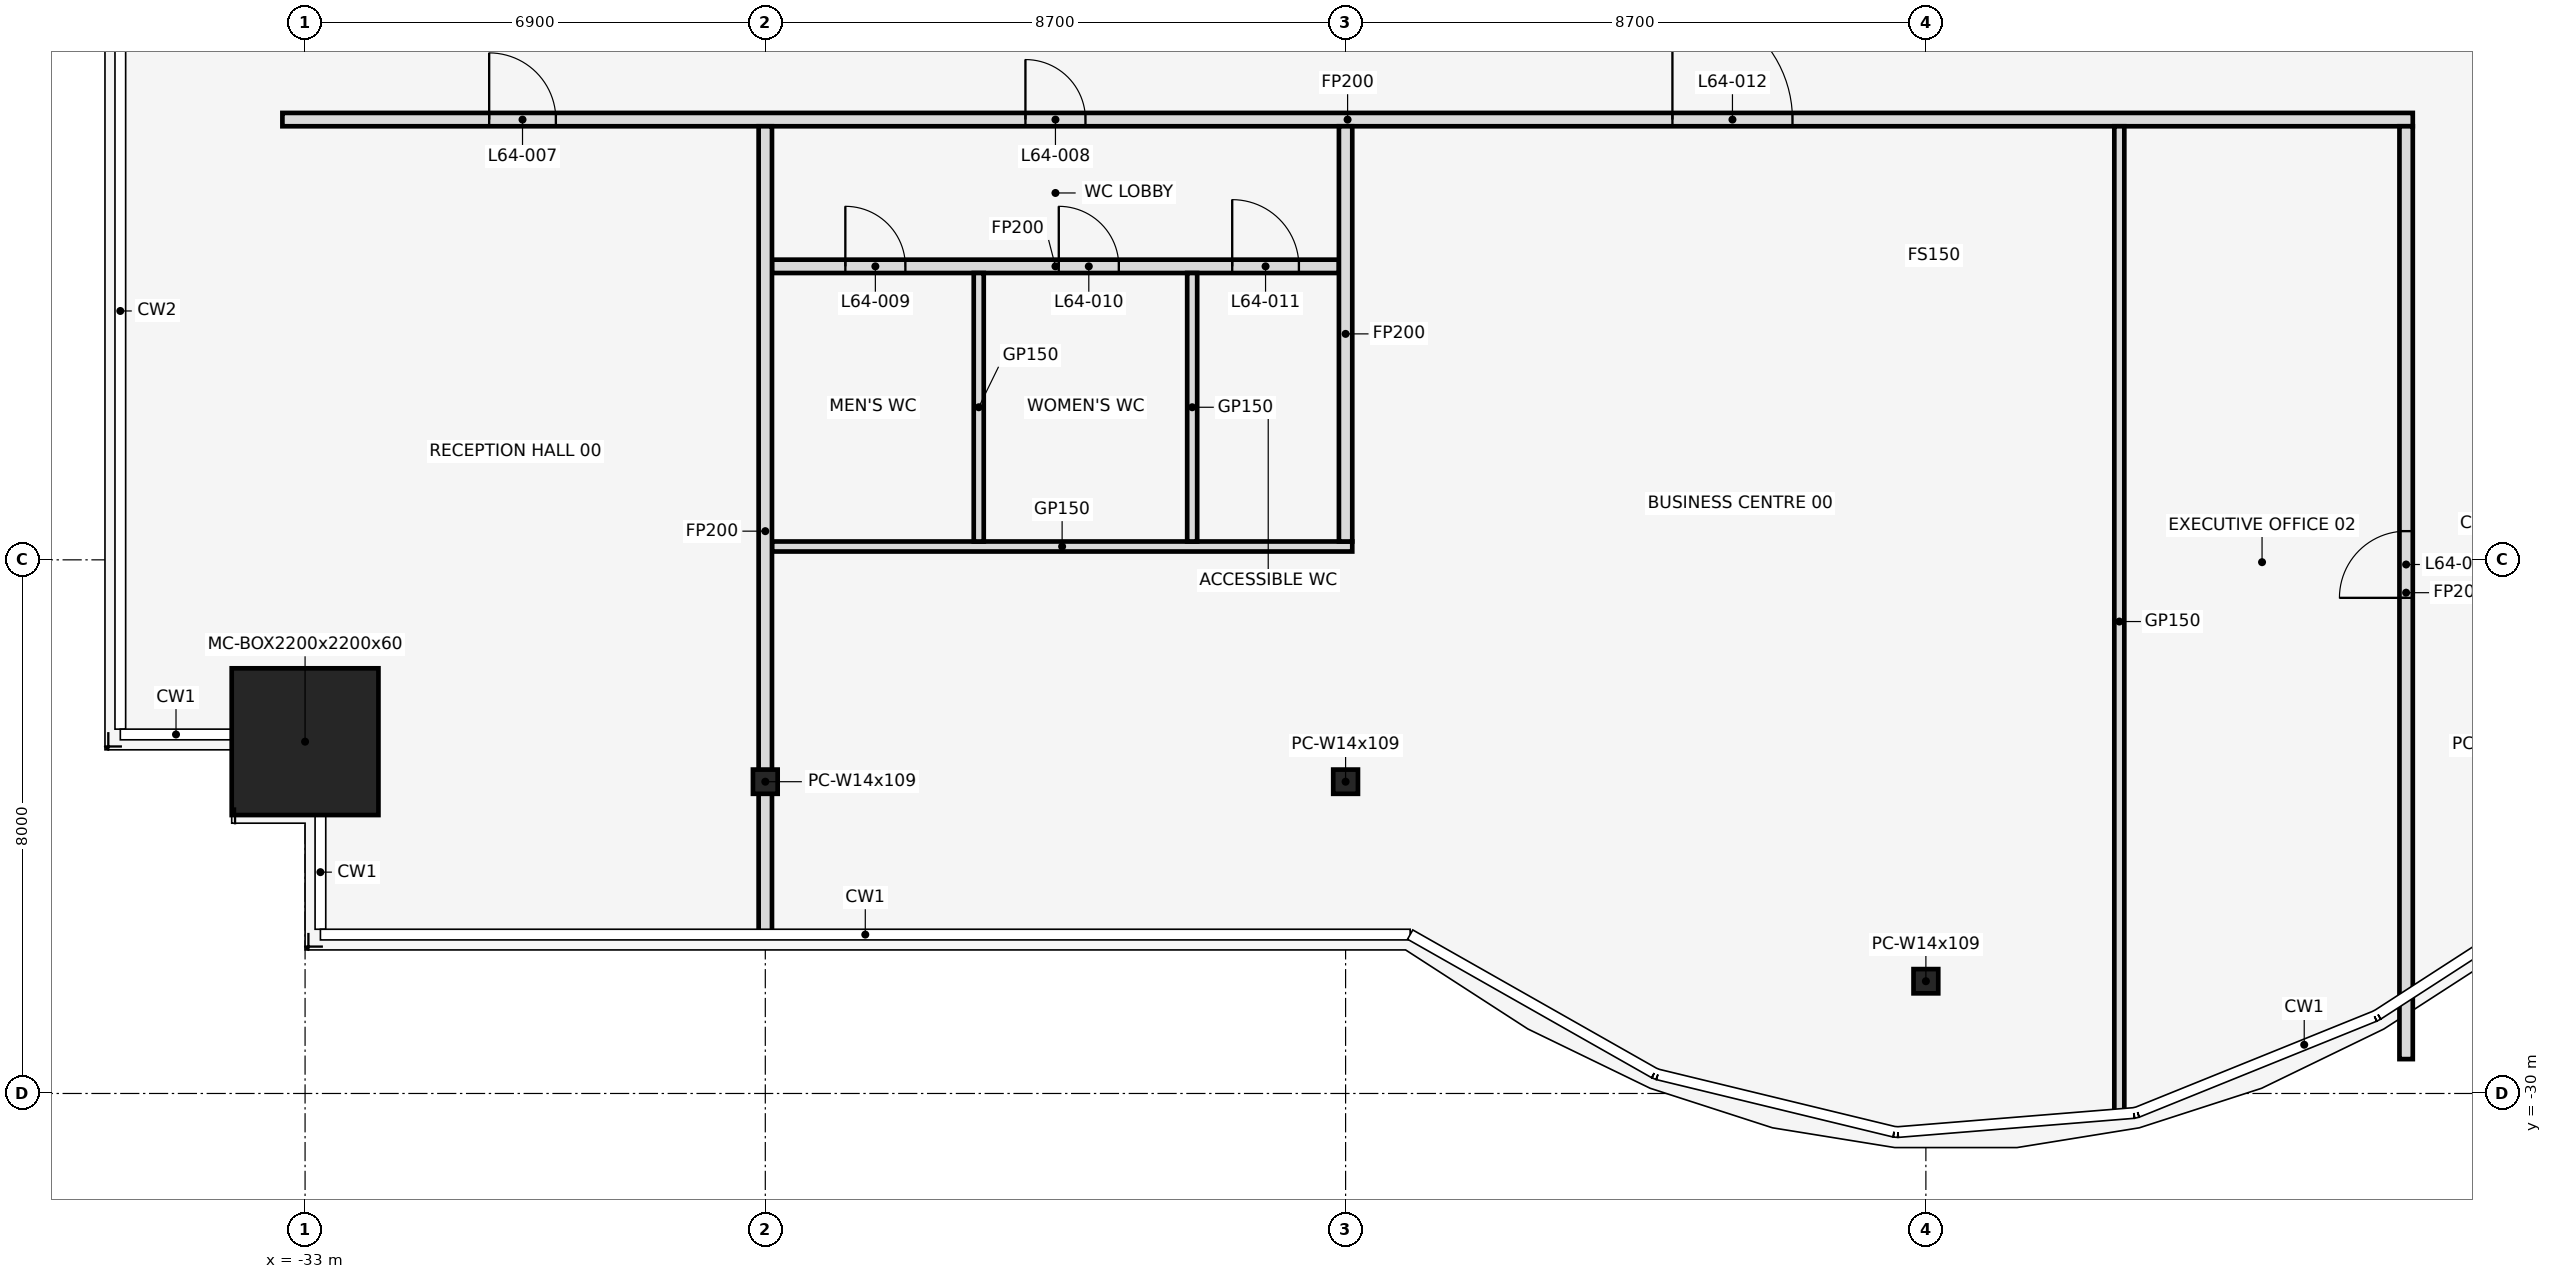
"""IFC4 building model, lengths in metres.
Left out: names, types, materials, properties, quantities, classifications, styles, units other than length and angle.
Written with IfcOpenShell. Run it as: python <this file> out.ifc"""

import sys

from ifc_helpers import new_model, si_unit, direction, frame, frame_2d, origin, origin_2d, place, context, subcontext, project, spatial, rectangle, hollow_rectangle, i_section, extrude, element, fill, save


model = new_model("IFC4")
c1 = context("Model", 3, precision=1e-05, world=origin(), true_north=direction((0.0, 1.0)))
c2 = subcontext(c1, "Body", "Model", "MODEL_VIEW")
j1 = project(units=[si_unit("LENGTHUNIT", "METRE"), si_unit("PLANEANGLEUNIT", "RADIAN")], contexts=[c1])
p1 = place(None, origin())
s1 = spatial("IfcSite", under=j1, at=p1, CompositionType="ELEMENT")
p2 = place(p1, origin())
s2 = spatial("IfcBuilding", under=s1, at=p2, CompositionType="ELEMENT")
p3 = place(p2, frame((0.0, 0.0, 283.4)))
s3 = spatial("IfcBuildingStorey", under=s2, at=p3, CompositionType="ELEMENT", Elevation=283.4)
p4 = place(p3, frame((-33.0, -24.726, 0.0), z_axis=(0.0, 0.0, 1.0), x_axis=(1.0, 0.0, 0.0)))
e1 = element("IfcColumn", 1, at=p4, inside=s3, PredefinedType="COLUMN", context=c2, shape_type="SweptSolid", body=[
    extrude(hollow_rectangle(XDim=2.2, YDim=2.2, WallThickness=0.06, at=origin_2d()), origin(), (0.0, 0.0, 1.0), 4.2),
])
for number, where, z_axis, x_axis in (
    (2, (-26.1, -25.326, 0.0), (0.0, 0.0, 1.0), (1.0, 0.0, 0.0)),
    (3, (-17.4, -25.326, 0.0), (0.0, 0.0, 1.0), (1.0, 0.0, 0.0)),
    (4, (-8.7, -28.317, 0.0), (0.0, 0.0, 1.0), (1.0, 0.0, 0.0)),
):
    element("IfcColumn", number, at=place(p3, frame(where, z_axis=z_axis, x_axis=x_axis)), inside=s3, PredefinedType="COLUMN", context=c2, shape_type="SweptSolid", body=[
        extrude(i_section(OverallWidth=0.371, OverallDepth=0.363, WebThickness=0.013, FlangeThickness=0.022, at=origin_2d()), origin(), (0.0, 0.0, 1.0), 4.2),
    ])
p5 = place(p3, frame((-26.0, -21.8, 0.0), z_axis=(0.0, 0.0, 1.0), x_axis=(1.0, 0.0, 0.0)))
e5 = element("IfcWall", 5, at=p5, inside=s3, PredefinedType="PARTITIONING", context=c2, shape_type="SweptSolid", body=[
    extrude(rectangle(XDim=8.7, YDim=0.15, at=frame_2d((4.35, 0.0))), origin(), (0.0, 0.0, 1.0), 3.068),
])
p6 = place(p3, frame((-26.0, -17.6, 0.0), z_axis=(0.0, 0.0, 1.0), x_axis=(1.0, 0.0, 0.0)))
e6 = element("IfcWall", 6, at=p6, inside=s3, PredefinedType="PARTITIONING", context=c2, shape_type="SweptSolid", body=[
    extrude(rectangle(XDim=8.5, YDim=0.2, at=frame_2d((4.25, 0.0))), origin(), (0.0, 0.0, 1.0), 3.068),
])
p7 = place(p6, frame((1.1, 0.0, 0.0)))
e7 = element("IfcOpeningElement", 7, at=p7, cuts=e6, PredefinedType="OPENING", context=c2, shape_type="SweptSolid", body=[
    extrude(rectangle(XDim=0.9, YDim=2.1, at=frame_2d((0.45, 1.05))), frame((0.0, 0.112, 0.0), z_axis=(0.0, -1.0, 0.0), x_axis=(1.0, 0.0, 0.0)), (0.0, 0.0, 1.0), 0.224),
])
p8 = place(p6, frame((4.3, 0.0, 0.0)))
e8 = element("IfcOpeningElement", 8, at=p8, cuts=e6, PredefinedType="OPENING", context=c2, shape_type="SweptSolid", body=[
    extrude(rectangle(XDim=0.9, YDim=2.1, at=frame_2d((0.45, 1.05))), frame((0.0, 0.112, 0.0), z_axis=(0.0, -1.0, 0.0), x_axis=(1.0, 0.0, 0.0)), (0.0, 0.0, 1.0), 0.224),
])
p9 = place(p6, frame((6.9, 0.0, 0.0)))
e9 = element("IfcOpeningElement", 9, at=p9, cuts=e6, PredefinedType="OPENING", context=c2, shape_type="SweptSolid", body=[
    extrude(rectangle(XDim=1.0, YDim=2.1, at=frame_2d((0.5, 1.05))), frame((0.0, 0.112, 0.0), z_axis=(0.0, -1.0, 0.0), x_axis=(1.0, 0.0, 0.0)), (0.0, 0.0, 1.0), 0.224),
])
p10 = place(p3, frame((-33.34, -15.4, 0.0), z_axis=(0.0, 0.0, 1.0), x_axis=(1.0, 0.0, 0.0)))
e10 = element("IfcWall", 10, at=p10, inside=s3, PredefinedType="PARTITIONING", context=c2, shape_type="SweptSolid", body=[
    extrude(rectangle(XDim=31.94, YDim=0.2, at=frame_2d((15.97, 0.0))), origin(), (0.0, 0.0, 1.0), 3.068),
])
p11 = place(p10, frame((3.1, 0.0, 0.0)))
e11 = element("IfcOpeningElement", 11, at=p11, cuts=e10, PredefinedType="OPENING", context=c2, shape_type="SweptSolid", body=[
    extrude(rectangle(XDim=1.0, YDim=2.1, at=frame_2d((0.5, 1.05))), frame((0.0, 0.112, 0.0), z_axis=(0.0, -1.0, 0.0), x_axis=(1.0, 0.0, 0.0)), (0.0, 0.0, 1.0), 0.224),
])
p12 = place(p10, frame((11.14, 0.0, 0.0)))
e12 = element("IfcOpeningElement", 12, at=p12, cuts=e10, PredefinedType="OPENING", context=c2, shape_type="SweptSolid", body=[
    extrude(rectangle(XDim=0.9, YDim=2.1, at=frame_2d((0.45, 1.05))), frame((0.0, 0.112, 0.0), z_axis=(0.0, -1.0, 0.0), x_axis=(1.0, 0.0, 0.0)), (0.0, 0.0, 1.0), 0.224),
])
p13 = place(p10, frame((20.84, 0.0, 0.0)))
e13 = element("IfcOpeningElement", 13, at=p13, cuts=e10, PredefinedType="OPENING", context=c2, shape_type="SweptSolid", body=[
    extrude(rectangle(XDim=1.8, YDim=2.1, at=frame_2d((0.9, 1.05))), frame((0.0, 0.112, 0.0), z_axis=(0.0, -1.0, 0.0), x_axis=(1.0, 0.0, 0.0)), (0.0, 0.0, 1.0), 0.224),
])
p14 = place(p3, frame((-26.1, -27.64, 0.0), z_axis=(0.0, 0.0, 1.0), x_axis=(0.0, 1.0, 0.0)))
e14 = element("IfcWall", 14, at=p14, inside=s3, PredefinedType="PARTITIONING", context=c2, shape_type="SweptSolid", body=[
    extrude(rectangle(XDim=12.14, YDim=0.2, at=frame_2d((6.07, 0.0))), origin(), (0.0, 0.0, 1.0), 3.068),
])
for number, where, z_axis, x_axis in (
    (15, (-22.9, -21.725, 0.0), (0.0, 0.0, 1.0), (0.0, 1.0, 0.0)),
    (16, (-19.7, -21.725, 0.0), (0.0, 0.0, 1.0), (0.0, 1.0, 0.0)),
):
    element("IfcWall", number, at=place(p3, frame(where, z_axis=z_axis, x_axis=x_axis)), inside=s3, PredefinedType="PARTITIONING", context=c2, shape_type="SweptSolid", body=[
        extrude(rectangle(XDim=4.025, YDim=0.15, at=frame_2d((2.013, 0.0))), origin(), (0.0, 0.0, 1.0), 3.068),
    ])
p15 = place(p3, frame((-17.4, -21.725, 0.0), z_axis=(0.0, 0.0, 1.0), x_axis=(0.0, 1.0, 0.0)))
e17 = element("IfcWall", 17, at=p15, inside=s3, PredefinedType="PARTITIONING", context=c2, shape_type="SweptSolid", body=[
    extrude(rectangle(XDim=6.225, YDim=0.2, at=frame_2d((3.113, 0.0))), origin(), (0.0, 0.0, 1.0), 3.068),
])
p16 = place(p3, frame((-5.8, -30.35, 0.0), z_axis=(0.0, 0.0, 1.0), x_axis=(0.0, 1.0, 0.0)))
e18 = element("IfcWall", 18, at=p16, inside=s3, PredefinedType="PARTITIONING", context=c2, shape_type="SweptSolid", body=[
    extrude(rectangle(XDim=14.85, YDim=0.15, at=frame_2d((7.425, 0.0))), origin(), (0.0, 0.0, 1.0), 3.068),
])
p17 = place(p3, frame((-1.5, -29.485, 0.0), z_axis=(0.0, 0.0, 1.0), x_axis=(0.0, 1.0, 0.0)))
e19 = element("IfcWall", 19, at=p17, inside=s3, PredefinedType="PARTITIONING", context=c2, shape_type="SweptSolid", body=[
    extrude(rectangle(XDim=13.985, YDim=0.2, at=frame_2d((6.992, 0.0))), origin(), (0.0, 0.0, 1.0), 3.068),
])
p18 = place(p17, frame((6.915, 0.0, 0.0)))
e20 = element("IfcOpeningElement", 20, at=p18, cuts=e19, PredefinedType="OPENING", context=c2, shape_type="SweptSolid", body=[
    extrude(rectangle(XDim=1.0, YDim=2.1, at=frame_2d((0.5, 1.05))), frame((0.0, 0.112, 0.0), z_axis=(0.0, -1.0, 0.0), x_axis=(1.0, 0.0, 0.0)), (0.0, 0.0, 1.0), 0.224),
])
p19 = place(p11, frame((1.0, 0.0, 0.0), z_axis=(0.0, 0.0, 1.0), x_axis=(-1.0, 0.0, 0.0)))
e21 = element("IfcDoor", 21, at=p19, inside=s3, OperationType="SINGLE_SWING_LEFT", PredefinedType="DOOR", context=c2, shape_type="SweptSolid", body=[
    extrude(rectangle(XDim=1.0, YDim=2.1, at=frame_2d((0.5, 1.05))), frame((0.0, 0.025, 0.0), z_axis=(0.0, -1.0, 0.0), x_axis=(1.0, 0.0, 0.0)), (0.0, 0.0, 1.0), 0.05),
])
fill(e11, e21)
p20 = place(p12, frame((0.9, 0.0, 0.0), z_axis=(0.0, 0.0, 1.0), x_axis=(-1.0, 0.0, 0.0)))
e22 = element("IfcDoor", 22, at=p20, inside=s3, OperationType="SINGLE_SWING_RIGHT", PredefinedType="DOOR", context=c2, shape_type="SweptSolid", body=[
    extrude(rectangle(XDim=0.9, YDim=2.1, at=frame_2d((0.45, 1.05))), frame((0.0, 0.025, 0.0), z_axis=(0.0, -1.0, 0.0), x_axis=(1.0, 0.0, 0.0)), (0.0, 0.0, 1.0), 0.05),
])
fill(e12, e22)
p21 = place(p7, frame((0.9, 0.0, 0.0), z_axis=(0.0, 0.0, 1.0), x_axis=(-1.0, 0.0, 0.0)))
e23 = element("IfcDoor", 23, at=p21, inside=s3, OperationType="SINGLE_SWING_RIGHT", PredefinedType="DOOR", context=c2, shape_type="SweptSolid", body=[
    extrude(rectangle(XDim=0.9, YDim=2.1, at=frame_2d((0.45, 1.05))), frame((0.0, 0.025, 0.0), z_axis=(0.0, -1.0, 0.0), x_axis=(1.0, 0.0, 0.0)), (0.0, 0.0, 1.0), 0.05),
])
fill(e7, e23)
p22 = place(p8, frame((0.9, 0.0, 0.0), z_axis=(0.0, 0.0, 1.0), x_axis=(-1.0, 0.0, 0.0)))
e24 = element("IfcDoor", 24, at=p22, inside=s3, OperationType="SINGLE_SWING_LEFT", PredefinedType="DOOR", context=c2, shape_type="SweptSolid", body=[
    extrude(rectangle(XDim=0.9, YDim=2.1, at=frame_2d((0.45, 1.05))), frame((0.0, 0.025, 0.0), z_axis=(0.0, -1.0, 0.0), x_axis=(1.0, 0.0, 0.0)), (0.0, 0.0, 1.0), 0.05),
])
fill(e8, e24)
p23 = place(p9, frame((1.0, 0.0, 0.0), z_axis=(0.0, 0.0, 1.0), x_axis=(-1.0, 0.0, 0.0)))
e25 = element("IfcDoor", 25, at=p23, inside=s3, OperationType="SINGLE_SWING_RIGHT", PredefinedType="DOOR", context=c2, shape_type="SweptSolid", body=[
    extrude(rectangle(XDim=1.0, YDim=2.1, at=frame_2d((0.5, 1.05))), frame((0.0, 0.025, 0.0), z_axis=(0.0, -1.0, 0.0), x_axis=(1.0, 0.0, 0.0)), (0.0, 0.0, 1.0), 0.05),
])
fill(e9, e25)
p24 = place(p13, origin())
e26 = element("IfcDoor", 26, at=p24, inside=s3, OperationType="SINGLE_SWING_LEFT", PredefinedType="DOOR", context=c2, shape_type="SweptSolid", body=[
    extrude(rectangle(XDim=1.8, YDim=2.1, at=frame_2d((0.9, 1.05))), frame((0.0, 0.025, 0.0), z_axis=(0.0, -1.0, 0.0), x_axis=(1.0, 0.0, 0.0)), (0.0, 0.0, 1.0), 0.05),
])
fill(e13, e26)
p25 = place(p18, origin())
e27 = element("IfcDoor", 27, at=p25, inside=s3, OperationType="SINGLE_SWING_LEFT", PredefinedType="DOOR", context=c2, shape_type="SweptSolid", body=[
    extrude(rectangle(XDim=1.0, YDim=2.1, at=frame_2d((0.5, 1.05))), frame((0.0, 0.025, 0.0), z_axis=(0.0, -1.0, 0.0), x_axis=(1.0, 0.0, 0.0)), (0.0, 0.0, 1.0), 0.05),
])
fill(e20, e27)
save(model, sys.argv[1])
